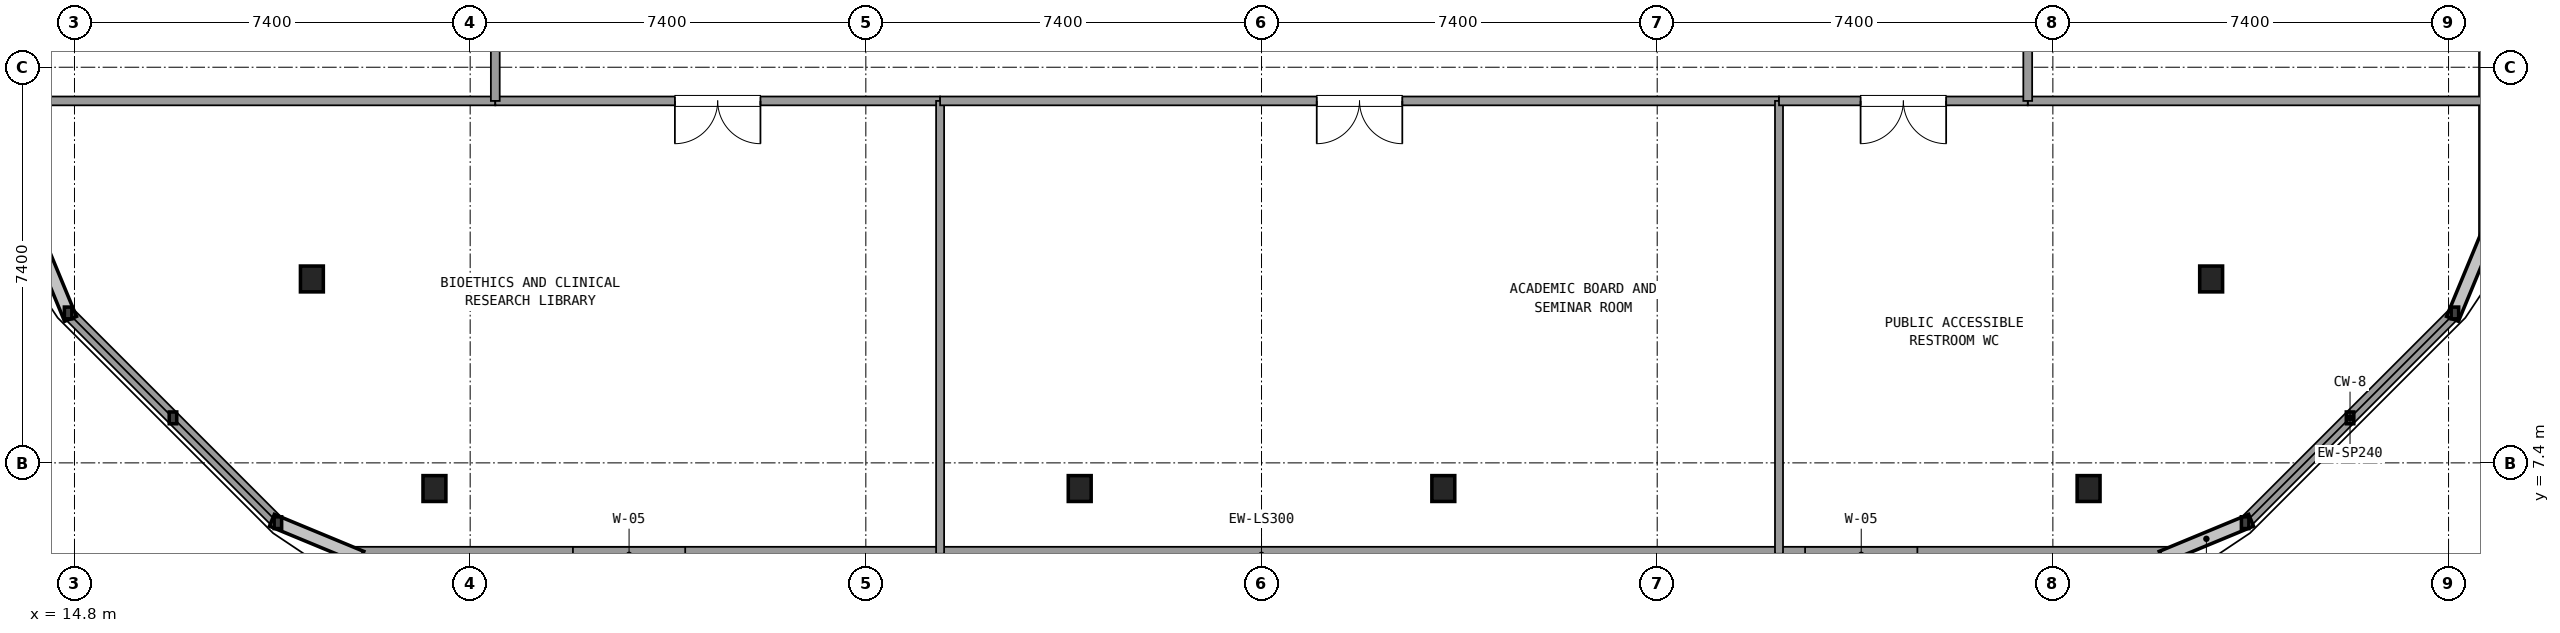
"""IFC4 building model, lengths in metres.
Left out: names, types, materials, properties, quantities, classifications, styles, units other than length and angle.
Written with IfcOpenShell. Run it as: python <this file> out.ifc"""

import sys

from ifc_helpers import new_model, si_unit, direction, frame, frame_2d, origin, origin_2d, place, context, subcontext, project, spatial, rectangle, i_section, extrude, element, fill, save


model = new_model("IFC4")
c1 = context("Model", 3, precision=1e-05, world=origin(), true_north=direction((0.0, 1.0)))
c2 = subcontext(c1, "Body", "Model", "MODEL_VIEW")
j1 = project(units=[si_unit("LENGTHUNIT", "METRE"), si_unit("PLANEANGLEUNIT", "RADIAN")], contexts=[c1])
p1 = place(None, origin())
s1 = spatial("IfcSite", under=j1, at=p1, CompositionType="ELEMENT")
p2 = place(p1, origin())
s2 = spatial("IfcBuilding", under=s1, at=p2, CompositionType="ELEMENT")
p3 = place(p2, frame((0.0, 0.0, 286.02)))
s3 = spatial("IfcBuildingStorey", under=s2, at=p3, CompositionType="ELEMENT", Elevation=286.02)
for number, where, z_axis, x_axis in (
    (1, (19.24, 10.84, 0.0), (0.0, 0.0, 1.0), (1.0, 0.0, 0.0)),
    (2, (21.532, 6.92, 0.0), (0.0, 0.0, 1.0), (1.0, 0.0, 0.0)),
    (3, (33.6, 6.92, 0.0), (0.0, 0.0, 1.0), (1.0, 0.0, 0.0)),
    (4, (40.4, 6.92, 0.0), (0.0, 0.0, 1.0), (1.0, 0.0, 0.0)),
    (5, (52.468, 6.92, 0.0), (0.0, 0.0, 1.0), (1.0, 0.0, 0.0)),
    (6, (54.76, 10.84, 0.0), (0.0, 0.0, 1.0), (1.0, 0.0, 0.0)),
):
    element("IfcColumn", number, at=place(p3, frame(where, z_axis=z_axis, x_axis=x_axis)), inside=s3, PredefinedType="COLUMN", context=c2, shape_type="SweptSolid", body=[
        extrude(i_section(OverallWidth=0.428, OverallDepth=0.483, WebThickness=0.042, FlangeThickness=0.068, at=origin_2d()), origin(), (0.0, 0.0, 1.0), 4.32),
    ])
p4 = place(p3, frame((20.055, 5.68, 0.0), z_axis=(0.0, 0.0, 1.0), x_axis=(1.0, 0.0, 0.0)))
e7 = element("IfcWall", 7, at=p4, inside=s3, PredefinedType="SOLIDWALL", context=c2, shape_type="SweptSolid", body=[
    extrude(rectangle(XDim=33.89, YDim=0.3, at=frame_2d((16.945, 0.0))), origin(), (0.0, 0.0, 1.0), 3.46),
])
p5 = place(p4, frame((4.067, 0.0, 0.85)))
e8 = element("IfcOpeningElement", 8, at=p5, cuts=e7, PredefinedType="OPENING", context=c2, shape_type="SweptSolid", body=[
    extrude(rectangle(XDim=2.1, YDim=1.65, at=frame_2d((1.05, 0.825))), frame((0.0, 0.16, 0.0), z_axis=(0.0, -1.0, 0.0), x_axis=(1.0, 0.0, 0.0)), (0.0, 0.0, 1.0), 0.32),
])
p6 = place(p4, frame((27.111, 0.0, 0.85)))
e9 = element("IfcOpeningElement", 9, at=p6, cuts=e7, PredefinedType="OPENING", context=c2, shape_type="SweptSolid", body=[
    extrude(rectangle(XDim=2.1, YDim=1.65, at=frame_2d((1.05, 0.825))), frame((0.0, 0.16, 0.0), z_axis=(0.0, -1.0, 0.0), x_axis=(1.0, 0.0, 0.0)), (0.0, 0.0, 1.0), 0.32),
])
p7 = place(p3, frame((55.396, 6.281, 0.0), z_axis=(0.0, 0.0, 1.0), x_axis=(0.707106781187, 0.707106781187, 0.0)))
e10 = element("IfcWall", 10, at=p7, inside=s3, PredefinedType="SOLIDWALL", context=c2, shape_type="SweptSolid", body=[
    extrude(rectangle(XDim=5.548, YDim=0.24, at=frame_2d((2.774, 0.0))), origin(), (0.0, 0.0, 1.0), 0.85),
])
p8 = place(p3, frame((59.92, 11.655, 0.0), z_axis=(0.0, 0.0, 1.0), x_axis=(0.0, 1.0, 0.0)))
e11 = element("IfcWall", 11, at=p8, inside=s3, PredefinedType="SOLIDWALL", context=c2, shape_type="SweptSolid", body=[
    extrude(rectangle(XDim=28.49, YDim=0.3, at=frame_2d((14.245, 0.0))), origin(), (0.0, 0.0, 1.0), 3.46),
])
p9 = place(p8, frame((7.122, 0.0, 0.85)))
e12 = element("IfcOpeningElement", 12, at=p9, cuts=e11, PredefinedType="OPENING", context=c2, shape_type="SweptSolid", body=[
    extrude(rectangle(XDim=1.5, YDim=1.65, at=frame_2d((0.75, 0.825))), frame((0.0, 0.16, 0.0), z_axis=(0.0, -1.0, 0.0), x_axis=(1.0, 0.0, 0.0)), (0.0, 0.0, 1.0), 0.32),
])
p10 = place(p8, frame((18.518, 0.0, 0.85)))
e13 = element("IfcOpeningElement", 13, at=p10, cuts=e11, PredefinedType="OPENING", context=c2, shape_type="SweptSolid", body=[
    extrude(rectangle(XDim=1.5, YDim=1.65, at=frame_2d((0.75, 0.825))), frame((0.0, 0.16, 0.0), z_axis=(0.0, -1.0, 0.0), x_axis=(1.0, 0.0, 0.0)), (0.0, 0.0, 1.0), 0.32),
])
p11 = place(p3, frame((14.681, 10.204, 0.0), z_axis=(0.0, 0.0, 1.0), x_axis=(0.707106781187, -0.707106781187, 0.0)))
e14 = element("IfcWall", 14, at=p11, inside=s3, PredefinedType="SOLIDWALL", context=c2, shape_type="SweptSolid", body=[
    extrude(rectangle(XDim=5.548, YDim=0.24, at=frame_2d((2.774, 0.0))), origin(), (0.0, 0.0, 1.0), 0.85),
])
for number, where, z_axis, x_axis in (
    (15, (14.1, 14.17, 0.0), (0.0, 0.0, 1.0), (1.0, 0.0, 0.0)),
    (16, (51.33, 14.17, 0.0), (0.0, 0.0, 1.0), (1.0, 0.0, 0.0)),
):
    element("IfcWall", number, at=place(p3, frame(where, z_axis=z_axis, x_axis=x_axis)), inside=s3, PredefinedType="PARTITIONING", context=c2, shape_type="SweptSolid", body=[
        extrude(rectangle(XDim=8.57, YDim=0.165, at=frame_2d((4.285, 0.0))), origin(), (0.0, 0.0, 1.0), 2.93),
    ])
p12 = place(p3, frame((22.67, 14.17, 0.0), z_axis=(0.0, 0.0, 1.0), x_axis=(1.0, 0.0, 0.0)))
e17 = element("IfcWall", 17, at=p12, inside=s3, PredefinedType="PARTITIONING", context=c2, shape_type="SweptSolid", body=[
    extrude(rectangle(XDim=8.319, YDim=0.165, at=frame_2d((4.16, 0.0))), origin(), (0.0, 0.0, 1.0), 2.93),
])
p13 = place(p12, frame((3.359, 0.0, 0.0)))
e18 = element("IfcOpeningElement", 18, at=p13, cuts=e17, PredefinedType="OPENING", context=c2, shape_type="SweptSolid", body=[
    extrude(rectangle(XDim=1.6, YDim=2.2, at=frame_2d((0.8, 1.1))), frame((0.0, 0.093, 0.0), z_axis=(0.0, -1.0, 0.0), x_axis=(1.0, 0.0, 0.0)), (0.0, 0.0, 1.0), 0.185),
])
p14 = place(p3, frame((30.989, 14.17, 0.0), z_axis=(0.0, 0.0, 1.0), x_axis=(0.0, -1.0, 0.0)))
e19 = element("IfcWall", 19, at=p14, inside=s3, PredefinedType="PARTITIONING", context=c2, shape_type="SweptSolid", body=[
    extrude(rectangle(XDim=8.47, YDim=0.15, at=frame_2d((4.235, 0.0))), origin(), (0.0, 0.0, 1.0), 2.93),
])
p15 = place(p3, frame((30.989, 14.17, 0.0), z_axis=(0.0, 0.0, 1.0), x_axis=(1.0, 0.0, 0.0)))
e20 = element("IfcWall", 20, at=p15, inside=s3, PredefinedType="PARTITIONING", context=c2, shape_type="SweptSolid", body=[
    extrude(rectangle(XDim=15.689, YDim=0.165, at=frame_2d((7.844, 0.0))), origin(), (0.0, 0.0, 1.0), 2.93),
])
p16 = place(p15, frame((7.044, 0.0, 0.0)))
e21 = element("IfcOpeningElement", 21, at=p16, cuts=e20, PredefinedType="OPENING", context=c2, shape_type="SweptSolid", body=[
    extrude(rectangle(XDim=1.6, YDim=2.2, at=frame_2d((0.8, 1.1))), frame((0.0, 0.093, 0.0), z_axis=(0.0, -1.0, 0.0), x_axis=(1.0, 0.0, 0.0)), (0.0, 0.0, 1.0), 0.185),
])
p17 = place(p3, frame((46.678, 14.17, 0.0), z_axis=(0.0, 0.0, 1.0), x_axis=(0.0, -1.0, 0.0)))
e22 = element("IfcWall", 22, at=p17, inside=s3, PredefinedType="PARTITIONING", context=c2, shape_type="SweptSolid", body=[
    extrude(rectangle(XDim=8.47, YDim=0.15, at=frame_2d((4.235, 0.0))), origin(), (0.0, 0.0, 1.0), 2.93),
])
p18 = place(p3, frame((46.678, 14.17, 0.0), z_axis=(0.0, 0.0, 1.0), x_axis=(1.0, 0.0, 0.0)))
e23 = element("IfcWall", 23, at=p18, inside=s3, PredefinedType="PARTITIONING", context=c2, shape_type="SweptSolid", body=[
    extrude(rectangle(XDim=4.652, YDim=0.165, at=frame_2d((2.326, 0.0))), origin(), (0.0, 0.0, 1.0), 2.93),
])
p19 = place(p18, frame((1.526, 0.0, 0.0)))
e24 = element("IfcOpeningElement", 24, at=p19, cuts=e23, PredefinedType="OPENING", context=c2, shape_type="SweptSolid", body=[
    extrude(rectangle(XDim=1.6, YDim=2.2, at=frame_2d((0.8, 1.1))), frame((0.0, 0.093, 0.0), z_axis=(0.0, -1.0, 0.0), x_axis=(1.0, 0.0, 0.0)), (0.0, 0.0, 1.0), 0.185),
])
p20 = place(p3, frame((22.67, 14.17, 0.0), z_axis=(0.0, 0.0, 1.0), x_axis=(0.0, 1.0, 0.0)))
e25 = element("IfcWall", 25, at=p20, inside=s3, PredefinedType="PARTITIONING", context=c2, shape_type="SweptSolid", body=[
    extrude(rectangle(XDim=23.46, YDim=0.165, at=frame_2d((11.73, 0.0))), origin(), (0.0, 0.0, 1.0), 2.93),
])
p21 = place(p20, frame((10.93, 0.0, 0.0)))
e26 = element("IfcOpeningElement", 26, at=p21, cuts=e25, PredefinedType="OPENING", context=c2, shape_type="SweptSolid", body=[
    extrude(rectangle(XDim=1.6, YDim=2.2, at=frame_2d((0.8, 1.1))), frame((0.0, 0.093, 0.0), z_axis=(0.0, -1.0, 0.0), x_axis=(1.0, 0.0, 0.0)), (0.0, 0.0, 1.0), 0.185),
])
p22 = place(p3, frame((51.33, 14.17, 0.0), z_axis=(0.0, 0.0, 1.0), x_axis=(0.0, 1.0, 0.0)))
e27 = element("IfcWall", 27, at=p22, inside=s3, PredefinedType="PARTITIONING", context=c2, shape_type="SweptSolid", body=[
    extrude(rectangle(XDim=23.46, YDim=0.165, at=frame_2d((11.73, 0.0))), origin(), (0.0, 0.0, 1.0), 2.93),
])
p23 = place(p22, frame((10.93, 0.0, 0.0)))
e28 = element("IfcOpeningElement", 28, at=p23, cuts=e27, PredefinedType="OPENING", context=c2, shape_type="SweptSolid", body=[
    extrude(rectangle(XDim=1.6, YDim=2.2, at=frame_2d((0.8, 1.1))), frame((0.0, 0.093, 0.0), z_axis=(0.0, -1.0, 0.0), x_axis=(1.0, 0.0, 0.0)), (0.0, 0.0, 1.0), 0.185),
])
p24 = place(p13, frame((1.6, 0.0, 0.0), z_axis=(0.0, 0.0, 1.0), x_axis=(-1.0, 0.0, 0.0)))
e29 = element("IfcDoor", 29, at=p24, inside=s3, OperationType="DOUBLE_DOOR_SINGLE_SWING", PredefinedType="DOOR", context=c2, shape_type="SweptSolid", body=[
    extrude(rectangle(XDim=1.6, YDim=2.2, at=frame_2d((0.8, 1.1))), frame((0.0, 0.025, 0.0), z_axis=(0.0, -1.0, 0.0), x_axis=(1.0, 0.0, 0.0)), (0.0, 0.0, 1.0), 0.05),
])
fill(e18, e29)
p25 = place(p16, frame((1.6, 0.0, 0.0), z_axis=(0.0, 0.0, 1.0), x_axis=(-1.0, 0.0, 0.0)))
e30 = element("IfcDoor", 30, at=p25, inside=s3, OperationType="DOUBLE_DOOR_SINGLE_SWING", PredefinedType="DOOR", context=c2, shape_type="SweptSolid", body=[
    extrude(rectangle(XDim=1.6, YDim=2.2, at=frame_2d((0.8, 1.1))), frame((0.0, 0.025, 0.0), z_axis=(0.0, -1.0, 0.0), x_axis=(1.0, 0.0, 0.0)), (0.0, 0.0, 1.0), 0.05),
])
fill(e21, e30)
p26 = place(p19, frame((1.6, 0.0, 0.0), z_axis=(0.0, 0.0, 1.0), x_axis=(-1.0, 0.0, 0.0)))
e31 = element("IfcDoor", 31, at=p26, inside=s3, OperationType="DOUBLE_DOOR_SINGLE_SWING", PredefinedType="DOOR", context=c2, shape_type="SweptSolid", body=[
    extrude(rectangle(XDim=1.6, YDim=2.2, at=frame_2d((0.8, 1.1))), frame((0.0, 0.025, 0.0), z_axis=(0.0, -1.0, 0.0), x_axis=(1.0, 0.0, 0.0)), (0.0, 0.0, 1.0), 0.05),
])
fill(e24, e31)
save(model, sys.argv[1])
